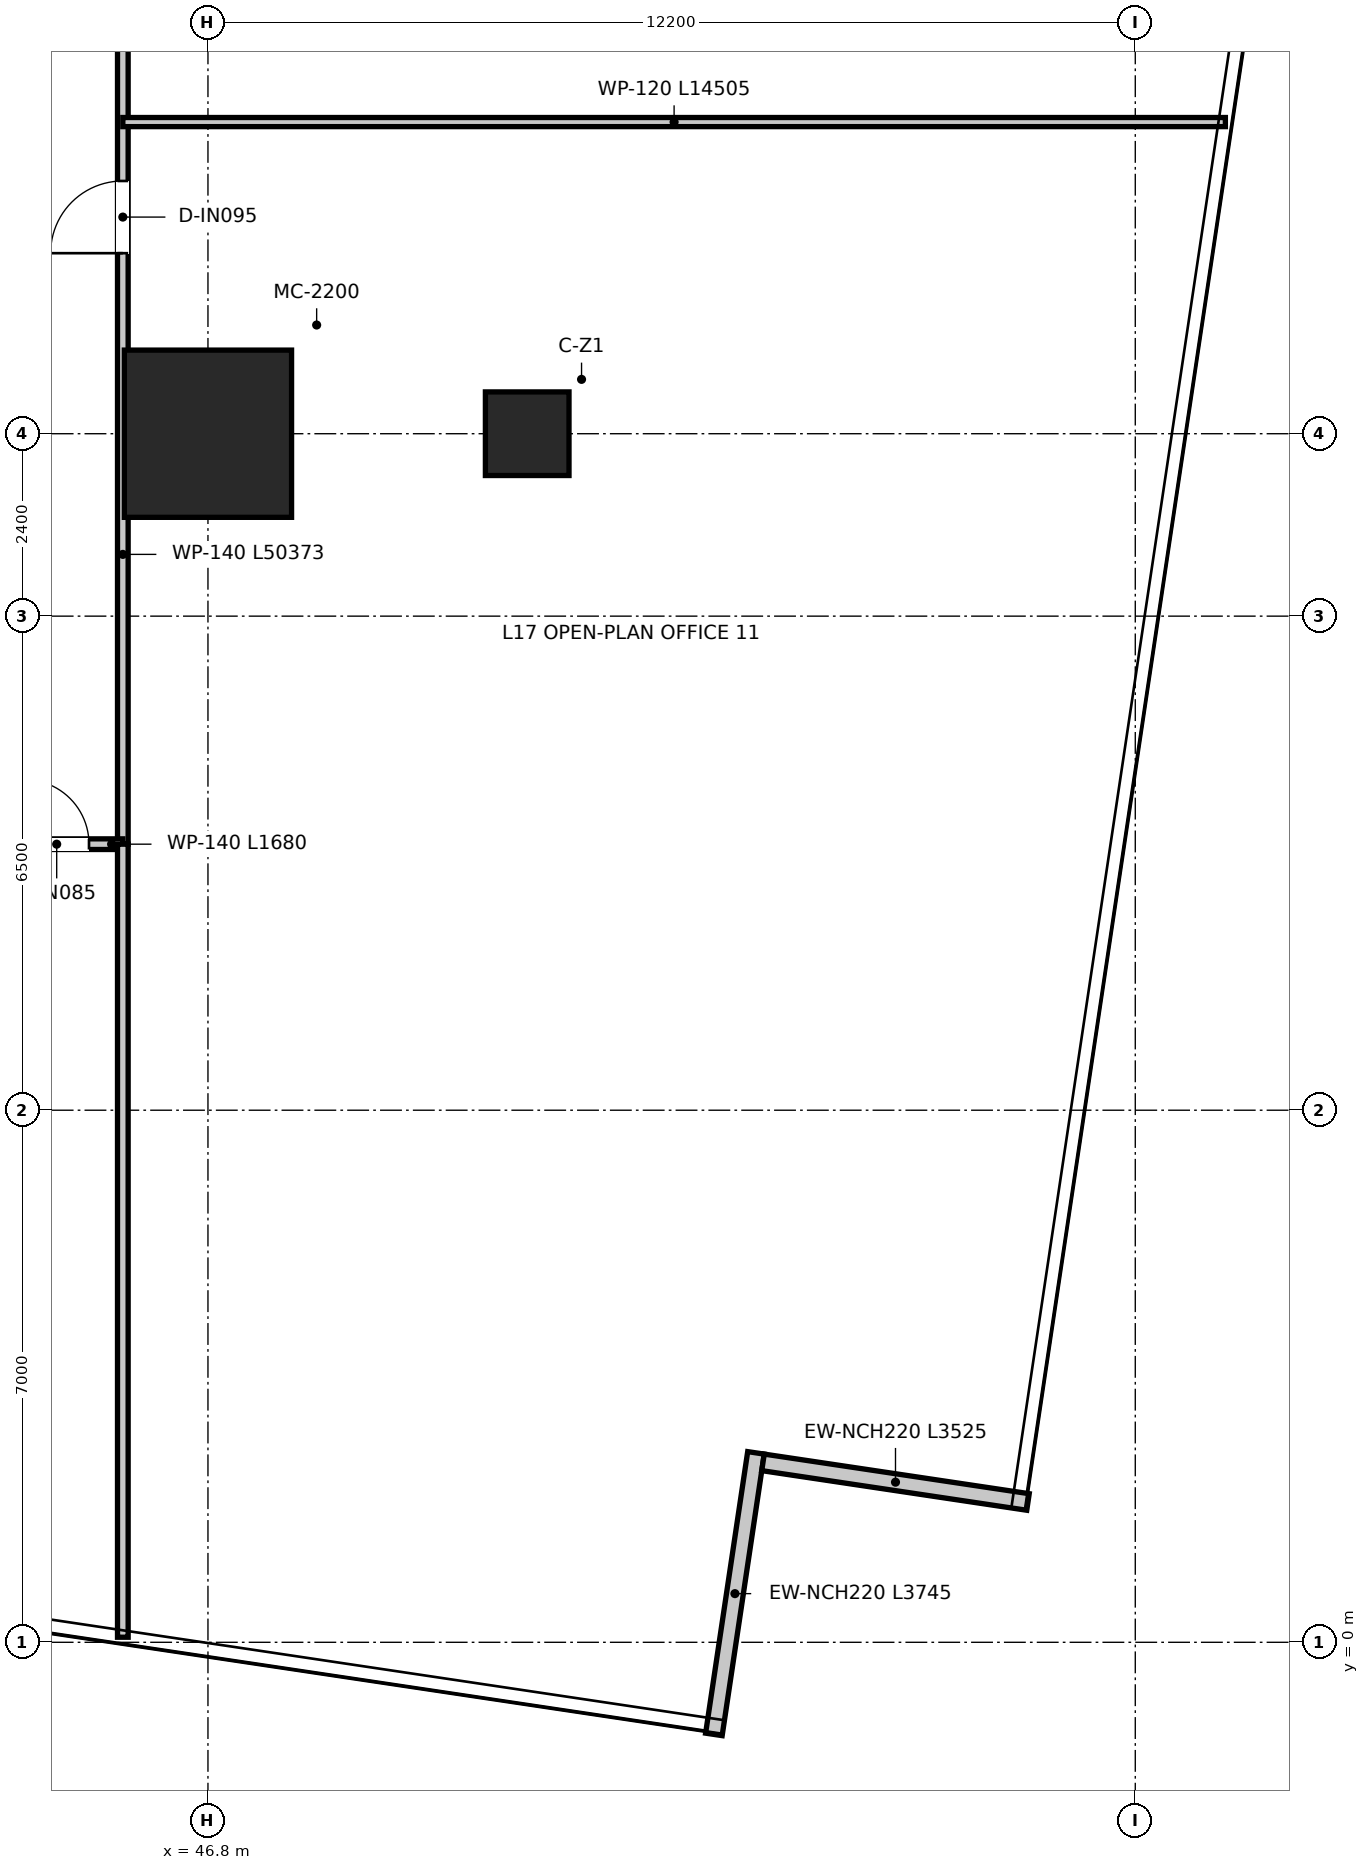
"""IFC4 building model, lengths in metres.
Left out: names, types, materials, properties, quantities, classifications, styles, units other than length and angle.
Written with IfcOpenShell. Run it as: python <this file> out.ifc"""

import sys

from ifc_helpers import new_model, si_unit, direction, frame, frame_2d, origin, origin_2d, place, context, subcontext, project, spatial, rectangle, extrude, source, transform, mapped, element, fill, save


model = new_model("IFC4")
c1 = context("Model", 3, precision=1e-05, world=origin(), true_north=direction((0.0, 1.0)))
c2 = subcontext(c1, "Body", "Model", "MODEL_VIEW")
j1 = project(units=[si_unit("LENGTHUNIT", "METRE"), si_unit("PLANEANGLEUNIT", "RADIAN")], contexts=[c1])
p1 = place(None, origin())
s1 = spatial("IfcSite", under=j1, at=p1, CompositionType="ELEMENT")
p2 = place(p1, origin())
s2 = spatial("IfcBuilding", under=s1, at=p2, CompositionType="ELEMENT")
p3 = place(p2, frame((0.0, 0.0, 72.4)))
s3 = spatial("IfcBuildingStorey", under=s2, at=p3, CompositionType="ELEMENT", Elevation=72.4)
m1 = source(origin(), c2, "Body", "SweptSolid", [
    extrude(rectangle(XDim=2.2, YDim=2.2, at=origin_2d()), origin(), (0.0, 0.0, 1.0), 3.95),
])
p4 = place(p3, frame((46.8, 15.9, 0.0), z_axis=(0.0, 0.0, 1.0), x_axis=(1.0, 0.0, 0.0)))
e1 = element("IfcColumn", 1, at=p4, inside=s3, PredefinedType="USERDEFINED", context=c2, shape_type="MappedRepresentation", body=[
    mapped(m1, transform((0.0, 0.0, 0.0), x_axis=(1.0, 0.0, 0.0), y_axis=(0.0, 1.0, 0.0), z_axis=(0.0, 0.0, 1.0), scale=1.0)),
])
m2 = source(origin(), c2, "Body", "SweptSolid", [
    extrude(rectangle(XDim=1.1, YDim=1.1, at=origin_2d()), origin(), (0.0, 0.0, 1.0), 3.95),
])
p5 = place(p3, frame((51.0, 15.9, 0.0), z_axis=(0.0, 0.0, 1.0), x_axis=(1.0, 0.0, 0.0)))
e2 = element("IfcColumn", 2, at=p5, inside=s3, PredefinedType="COLUMN", context=c2, shape_type="MappedRepresentation", body=[
    mapped(m2, transform((0.0, 0.0, 0.0), x_axis=(1.0, 0.0, 0.0), y_axis=(0.0, 1.0, 0.0), z_axis=(0.0, 0.0, 1.0), scale=1.0)),
])
p6 = place(p3, frame((53.456, -1.212, 0.0), z_axis=(0.0, 0.0, 1.0), x_axis=(0.147852699435, 0.989009392913, 0.0)))
e3 = element("IfcWall", 3, at=p6, inside=s3, PredefinedType="ELEMENTEDWALL", context=c2, shape_type="SweptSolid", body=[
    extrude(rectangle(XDim=3.745, YDim=0.22, at=frame_2d((1.873, 0.0))), origin(), (0.0, 0.0, 1.0), 3.67),
])
p7 = place(p3, frame((54.102, 2.367, 0.0), z_axis=(0.0, 0.0, 1.0), x_axis=(0.989015973204, -0.147808676155, 0.0)))
e4 = element("IfcWall", 4, at=p7, inside=s3, PredefinedType="ELEMENTEDWALL", context=c2, shape_type="SweptSolid", body=[
    extrude(rectangle(XDim=3.525, YDim=0.22, at=frame_2d((1.762, 0.0))), origin(), (0.0, 0.0, 1.0), 3.67),
])
p8 = place(p3, frame((45.68, 10.5, 0.0), z_axis=(0.0, 0.0, 1.0), x_axis=(0.0, 1.0, 0.0)))
e5 = element("IfcWall", 5, at=p8, inside=s3, PredefinedType="PARTITIONING", context=c2, shape_type="SweptSolid", body=[
    extrude(rectangle(XDim=25.62, YDim=0.14, at=frame_2d((12.81, 0.0))), origin(), (0.0, 0.0, 1.0), 2.97),
])
p9 = place(p8, frame((7.775, 0.0, 0.0)))
e6 = element("IfcOpeningElement", 6, at=p9, cuts=e5, PredefinedType="OPENING", context=c2, shape_type="SweptSolid", body=[
    extrude(rectangle(XDim=0.95, YDim=2.1, at=frame_2d((0.475, 1.05))), frame((0.0, 0.08, 0.0), z_axis=(0.0, -1.0, 0.0), x_axis=(1.0, 0.0, 0.0)), (0.0, 0.0, 1.0), 0.16),
])
p10 = place(p8, frame((11.275, 0.0, 0.0)))
e7 = element("IfcOpeningElement", 7, at=p10, cuts=e5, PredefinedType="OPENING", context=c2, shape_type="SweptSolid", body=[
    extrude(rectangle(XDim=0.95, YDim=2.1, at=frame_2d((0.475, 1.05))), frame((0.0, 0.08, 0.0), z_axis=(0.0, -1.0, 0.0), x_axis=(1.0, 0.0, 0.0)), (0.0, 0.0, 1.0), 0.16),
])
p11 = place(p8, frame((15.775, 0.0, 0.0)))
e8 = element("IfcOpeningElement", 8, at=p11, cuts=e5, PredefinedType="OPENING", context=c2, shape_type="SweptSolid", body=[
    extrude(rectangle(XDim=0.95, YDim=2.1, at=frame_2d((0.475, 1.05))), frame((0.0, 0.08, 0.0), z_axis=(0.0, -1.0, 0.0), x_axis=(1.0, 0.0, 0.0)), (0.0, 0.0, 1.0), 0.16),
])
p12 = place(p8, frame((20.125, 0.0, 0.0)))
e9 = element("IfcOpeningElement", 9, at=p12, cuts=e5, PredefinedType="OPENING", context=c2, shape_type="SweptSolid", body=[
    extrude(rectangle(XDim=0.95, YDim=2.1, at=frame_2d((0.475, 1.05))), frame((0.0, 0.08, 0.0), z_axis=(0.0, -1.0, 0.0), x_axis=(1.0, 0.0, 0.0)), (0.0, 0.0, 1.0), 0.16),
])
p13 = place(p8, frame((22.975, 0.0, 0.0)))
e10 = element("IfcOpeningElement", 10, at=p13, cuts=e5, PredefinedType="OPENING", context=c2, shape_type="SweptSolid", body=[
    extrude(rectangle(XDim=0.95, YDim=2.1, at=frame_2d((0.475, 1.05))), frame((0.0, 0.08, 0.0), z_axis=(0.0, -1.0, 0.0), x_axis=(1.0, 0.0, 0.0)), (0.0, 0.0, 1.0), 0.16),
])
p14 = place(p3, frame((44.0, 10.5, 0.0), z_axis=(0.0, 0.0, 1.0), x_axis=(1.0, 0.0, 0.0)))
e11 = element("IfcWall", 11, at=p14, inside=s3, PredefinedType="PARTITIONING", context=c2, shape_type="SweptSolid", body=[
    extrude(rectangle(XDim=1.68, YDim=0.14, at=frame_2d((0.84, 0.0))), origin(), (0.0, 0.0, 1.0), 3.67),
])
p15 = place(p14, frame((0.385, 0.0, 0.0)))
e12 = element("IfcOpeningElement", 12, at=p15, cuts=e11, PredefinedType="OPENING", context=c2, shape_type="SweptSolid", body=[
    extrude(rectangle(XDim=0.85, YDim=2.1, at=frame_2d((0.425, 1.05))), frame((0.0, 0.08, 0.0), z_axis=(0.0, -1.0, 0.0), x_axis=(1.0, 0.0, 0.0)), (0.0, 0.0, 1.0), 0.16),
])
p16 = place(p3, frame((45.68, 0.067, 0.0), z_axis=(0.0, 0.0, 1.0), x_axis=(0.0, 1.0, 0.0)))
e13 = element("IfcWall", 13, at=p16, inside=s3, PredefinedType="PARTITIONING", context=c2, shape_type="SweptSolid", body=[
    extrude(rectangle(XDim=10.433, YDim=0.14, at=frame_2d((5.217, 0.0))), origin(), (0.0, 0.0, 1.0), 3.67),
])
p17 = place(p3, frame((45.68, 20.0, 0.0), z_axis=(0.0, 0.0, 1.0), x_axis=(1.0, 0.0, 0.0)))
e14 = element("IfcWall", 14, at=p17, inside=s3, PredefinedType="PARTITIONING", context=c2, shape_type="SweptSolid", body=[
    extrude(rectangle(XDim=14.505, YDim=0.12, at=frame_2d((7.253, 0.0))), origin(), (0.0, 0.0, 1.0), 2.97),
])
p18 = place(p9, origin())
e15 = element("IfcDoor", 15, at=p18, inside=s3, OperationType="SINGLE_SWING_LEFT", PredefinedType="DOOR", context=c2, shape_type="SweptSolid", body=[
    extrude(rectangle(XDim=0.95, YDim=2.1, at=frame_2d((0.475, 1.05))), frame((0.0, 0.025, 0.0), z_axis=(0.0, -1.0, 0.0), x_axis=(1.0, 0.0, 0.0)), (0.0, 0.0, 1.0), 0.05),
])
fill(e6, e15)
p19 = place(p15, origin())
e16 = element("IfcDoor", 16, at=p19, inside=s3, OperationType="SINGLE_SWING_LEFT", PredefinedType="DOOR", context=c2, shape_type="SweptSolid", body=[
    extrude(rectangle(XDim=0.85, YDim=2.1, at=frame_2d((0.425, 1.05))), frame((0.0, 0.025, 0.0), z_axis=(0.0, -1.0, 0.0), x_axis=(1.0, 0.0, 0.0)), (0.0, 0.0, 1.0), 0.05),
])
fill(e12, e16)
save(model, sys.argv[1])
